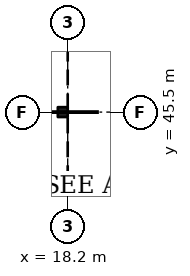
"""IFC4 building model, lengths in metres.
Left out: names, types, materials, properties, quantities, classifications, styles, units other than length and angle.
Written with IfcOpenShell. Run it as: python <this file> out.ifc"""

import sys

from ifc_helpers import new_model, si_unit, direction, frame, frame_2d, origin, origin_2d, place, context, subcontext, project, spatial, rectangle, extrude, element, save


model = new_model("IFC4")
c1 = context("Model", 3, precision=1e-05, world=origin(), true_north=direction((0.0, 1.0)))
c2 = subcontext(c1, "Body", "Model", "MODEL_VIEW")
j1 = project(units=[si_unit("LENGTHUNIT", "METRE"), si_unit("PLANEANGLEUNIT", "RADIAN")], contexts=[c1])
p1 = place(None, origin())
s1 = spatial("IfcSite", under=j1, at=p1, CompositionType="ELEMENT")
p2 = place(p1, origin())
s2 = spatial("IfcBuilding", under=s1, at=p2, CompositionType="ELEMENT")
p3 = place(p2, frame((0.0, 0.0, 6.37)))
s3 = spatial("IfcBuildingStorey", under=s2, at=p3, CompositionType="ELEMENT", Elevation=6.37)
p4 = place(p3, frame((17.875, 45.5, 0.0), z_axis=(0.0, 0.0, 1.0), x_axis=(1.0, 0.0, 0.0)))
e1 = element("IfcColumn", 1, at=p4, inside=s3, PredefinedType="COLUMN", context=c2, shape_type="SweptSolid", body=[
    extrude(rectangle(XDim=0.65, YDim=0.65, at=origin_2d()), origin(), (0.0, 0.0, 1.0), 4.55),
])
p5 = place(p3, frame((40.95, 40.75, 0.0), z_axis=(0.0, 0.0, 1.0), x_axis=(-1.0, 0.0, 0.0)))
e2 = element("IfcWall", 2, at=p5, inside=s3, PredefinedType="SHEAR", context=c2, shape_type="SweptSolid", body=[
    extrude(rectangle(XDim=22.75, YDim=0.4, at=frame_2d((11.375, 0.0))), origin(), (0.0, 0.0, 1.0), 4.55),
])
save(model, sys.argv[1])
